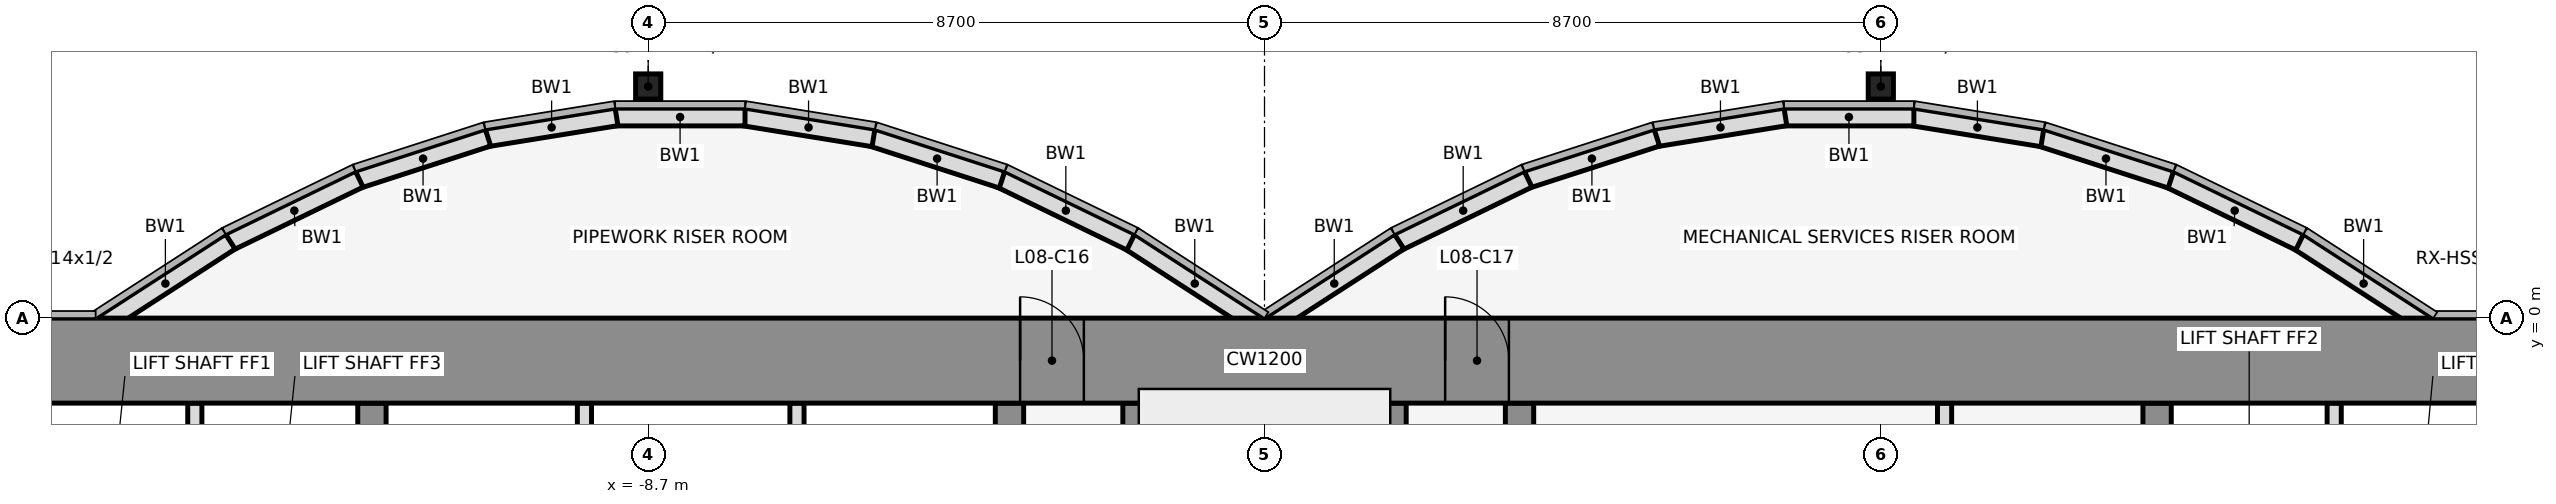
"""IFC4 building model, lengths in metres.
Left out: names, types, materials, properties, quantities, classifications, styles, units other than length and angle.
Written with IfcOpenShell. Run it as: python <this file> out.ifc"""

import sys

from ifc_helpers import new_model, si_unit, direction, frame, frame_2d, origin, origin_2d, place, context, subcontext, project, spatial, rectangle, hollow_rectangle, extrude, element, fill, save


model = new_model("IFC4")
c1 = context("Model", 3, precision=1e-05, world=origin(), true_north=direction((0.0, 1.0)))
c2 = subcontext(c1, "Body", "Model", "MODEL_VIEW")
j1 = project(units=[si_unit("LENGTHUNIT", "METRE"), si_unit("PLANEANGLEUNIT", "RADIAN")], contexts=[c1])
p1 = place(None, origin())
s1 = spatial("IfcSite", under=j1, at=p1, CompositionType="ELEMENT")
p2 = place(p1, origin())
s2 = spatial("IfcBuilding", under=s1, at=p2, CompositionType="ELEMENT")
p3 = place(p2, frame((0.0, 0.0, 44.0)))
s3 = spatial("IfcBuildingStorey", under=s2, at=p3, CompositionType="ELEMENT", Elevation=44.0)
for number, where, z_axis, x_axis in (
    (1, (-8.7, 3.269, 0.0), (0.0, 0.0, 1.0), (1.0, 0.0, 0.0)),
    (2, (8.7, 3.269, 0.0), (0.0, 0.0, 1.0), (1.0, 0.0, 0.0)),
):
    element("IfcColumn", number, at=place(p3, frame(where, z_axis=z_axis, x_axis=x_axis)), inside=s3, PredefinedType="COLUMN", context=c2, shape_type="SweptSolid", body=[
        extrude(hollow_rectangle(XDim=0.356, YDim=0.356, WallThickness=0.012, at=origin_2d()), origin(), (0.0, 0.0, 1.0), 4.5),
    ])
p4 = place(p3, frame((16.432, -0.105, 0.0), z_axis=(0.0, 0.0, 1.0), x_axis=(-0.83981312244, 0.542875602121, 0.0)))
e3 = element("IfcWall", 3, at=p4, inside=s3, PredefinedType="STANDARD", context=c2, shape_type="SweptSolid", body=[
    extrude(rectangle(XDim=2.183, YDim=0.25, at=frame_2d((1.091, 0.0))), origin(), (0.0, 0.0, 1.0), 4.35),
])
p5 = place(p3, frame((14.612, 1.073, 0.0), z_axis=(0.0, 0.0, 1.0), x_axis=(-0.89982408427, 0.436252928206, 0.0)))
e4 = element("IfcWall", 4, at=p5, inside=s3, PredefinedType="STANDARD", context=c2, shape_type="SweptSolid", body=[
    extrude(rectangle(XDim=2.038, YDim=0.25, at=frame_2d((1.019, 0.0))), origin(), (0.0, 0.0, 1.0), 4.35),
])
p6 = place(p3, frame((12.795, 1.955, 0.0), z_axis=(0.0, 0.0, 1.0), x_axis=(-0.951495806175, 0.307661714928, 0.0)))
e5 = element("IfcWall", 5, at=p6, inside=s3, PredefinedType="STANDARD", context=c2, shape_type="SweptSolid", body=[
    extrude(rectangle(XDim=1.927, YDim=0.25, at=frame_2d((0.963, 0.0))), origin(), (0.0, 0.0, 1.0), 4.35),
])
p7 = place(p3, frame((10.98, 2.543, 0.0), z_axis=(0.0, 0.0, 1.0), x_axis=(-0.987181718931, 0.159600293885, 0.0)))
e6 = element("IfcWall", 6, at=p7, inside=s3, PredefinedType="STANDARD", context=c2, shape_type="SweptSolid", body=[
    extrude(rectangle(XDim=1.857, YDim=0.25, at=frame_2d((0.929, 0.0))), origin(), (0.0, 0.0, 1.0), 4.35),
])
p8 = place(p3, frame((9.167, 2.838, 0.0), z_axis=(0.0, 0.0, 1.0), x_axis=(-1.0, 0.0, 0.0)))
e7 = element("IfcWall", 7, at=p8, inside=s3, PredefinedType="STANDARD", context=c2, shape_type="SweptSolid", body=[
    extrude(rectangle(XDim=1.833, YDim=0.25, at=frame_2d((0.917, 0.0))), origin(), (0.0, 0.0, 1.0), 4.35),
])
p9 = place(p3, frame((7.353, 2.84, 0.0), z_axis=(0.0, 0.0, 1.0), x_axis=(-0.987181718931, -0.159600293885, 0.0)))
e8 = element("IfcWall", 8, at=p9, inside=s3, PredefinedType="STANDARD", context=c2, shape_type="SweptSolid", body=[
    extrude(rectangle(XDim=1.857, YDim=0.25, at=frame_2d((0.929, 0.0))), origin(), (0.0, 0.0, 1.0), 4.35),
])
p10 = place(p3, frame((5.538, 2.548, 0.0), z_axis=(0.0, 0.0, 1.0), x_axis=(-0.951495806175, -0.307661714928, 0.0)))
e9 = element("IfcWall", 9, at=p10, inside=s3, PredefinedType="STANDARD", context=c2, shape_type="SweptSolid", body=[
    extrude(rectangle(XDim=1.927, YDim=0.25, at=frame_2d((0.963, 0.0))), origin(), (0.0, 0.0, 1.0), 4.35),
])
p11 = place(p3, frame((3.721, 1.962, 0.0), z_axis=(0.0, 0.0, 1.0), x_axis=(-0.89982408427, -0.436252928206, 0.0)))
e10 = element("IfcWall", 10, at=p11, inside=s3, PredefinedType="STANDARD", context=c2, shape_type="SweptSolid", body=[
    extrude(rectangle(XDim=2.038, YDim=0.25, at=frame_2d((1.019, 0.0))), origin(), (0.0, 0.0, 1.0), 4.35),
])
for number, where, z_axis, x_axis in (
    (11, (1.901, 1.08, 0.0), (0.0, 0.0, 1.0), (-0.84, -0.543, 0.0)),
    (12, (-0.068, -0.105, 0.0), (0.0, 0.0, 1.0), (-0.84, 0.543, 0.0)),
):
    element("IfcWall", number, at=place(p3, frame(where, z_axis=z_axis, x_axis=x_axis)), inside=s3, PredefinedType="STANDARD", context=c2, shape_type="SweptSolid", body=[
        extrude(rectangle(XDim=2.183, YDim=0.25, at=frame_2d((1.091, 0.0))), origin(), (0.0, 0.0, 1.0), 4.35),
    ])
p12 = place(p3, frame((-1.888, 1.073, 0.0), z_axis=(0.0, 0.0, 1.0), x_axis=(-0.89982408427, 0.436252928206, 0.0)))
e13 = element("IfcWall", 13, at=p12, inside=s3, PredefinedType="STANDARD", context=c2, shape_type="SweptSolid", body=[
    extrude(rectangle(XDim=2.038, YDim=0.25, at=frame_2d((1.019, 0.0))), origin(), (0.0, 0.0, 1.0), 4.35),
])
p13 = place(p3, frame((-3.705, 1.955, 0.0), z_axis=(0.0, 0.0, 1.0), x_axis=(-0.951495806175, 0.307661714928, 0.0)))
e14 = element("IfcWall", 14, at=p13, inside=s3, PredefinedType="STANDARD", context=c2, shape_type="SweptSolid", body=[
    extrude(rectangle(XDim=1.927, YDim=0.25, at=frame_2d((0.963, 0.0))), origin(), (0.0, 0.0, 1.0), 4.35),
])
p14 = place(p3, frame((-5.52, 2.543, 0.0), z_axis=(0.0, 0.0, 1.0), x_axis=(-0.987181718931, 0.159600293885, 0.0)))
e15 = element("IfcWall", 15, at=p14, inside=s3, PredefinedType="STANDARD", context=c2, shape_type="SweptSolid", body=[
    extrude(rectangle(XDim=1.857, YDim=0.25, at=frame_2d((0.929, 0.0))), origin(), (0.0, 0.0, 1.0), 4.35),
])
p15 = place(p3, frame((-7.333, 2.838, 0.0), z_axis=(0.0, 0.0, 1.0), x_axis=(-1.0, 0.0, 0.0)))
e16 = element("IfcWall", 16, at=p15, inside=s3, PredefinedType="STANDARD", context=c2, shape_type="SweptSolid", body=[
    extrude(rectangle(XDim=1.833, YDim=0.25, at=frame_2d((0.917, 0.0))), origin(), (0.0, 0.0, 1.0), 4.35),
])
p16 = place(p3, frame((-9.147, 2.84, 0.0), z_axis=(0.0, 0.0, 1.0), x_axis=(-0.987181718931, -0.159600293885, 0.0)))
e17 = element("IfcWall", 17, at=p16, inside=s3, PredefinedType="STANDARD", context=c2, shape_type="SweptSolid", body=[
    extrude(rectangle(XDim=1.857, YDim=0.25, at=frame_2d((0.929, 0.0))), origin(), (0.0, 0.0, 1.0), 4.35),
])
p17 = place(p3, frame((-10.962, 2.548, 0.0), z_axis=(0.0, 0.0, 1.0), x_axis=(-0.951495806175, -0.307661714928, 0.0)))
e18 = element("IfcWall", 18, at=p17, inside=s3, PredefinedType="STANDARD", context=c2, shape_type="SweptSolid", body=[
    extrude(rectangle(XDim=1.927, YDim=0.25, at=frame_2d((0.963, 0.0))), origin(), (0.0, 0.0, 1.0), 4.35),
])
p18 = place(p3, frame((-12.779, 1.962, 0.0), z_axis=(0.0, 0.0, 1.0), x_axis=(-0.89982408427, -0.436252928206, 0.0)))
e19 = element("IfcWall", 19, at=p18, inside=s3, PredefinedType="STANDARD", context=c2, shape_type="SweptSolid", body=[
    extrude(rectangle(XDim=2.038, YDim=0.25, at=frame_2d((1.019, 0.0))), origin(), (0.0, 0.0, 1.0), 4.35),
])
p19 = place(p3, frame((-14.599, 1.08, 0.0), z_axis=(0.0, 0.0, 1.0), x_axis=(-0.83981312244, -0.542875602121, 0.0)))
e20 = element("IfcWall", 20, at=p19, inside=s3, PredefinedType="STANDARD", context=c2, shape_type="SweptSolid", body=[
    extrude(rectangle(XDim=2.183, YDim=0.25, at=frame_2d((1.091, 0.0))), origin(), (0.0, 0.0, 1.0), 4.35),
])
p20 = place(p3, frame((-15.1, -4.6, 0.0), z_axis=(0.0, 0.0, 1.0), x_axis=(0.0, 1.0, 0.0)))
e21 = element("IfcWall", 21, at=p20, inside=s3, PredefinedType="PARTITIONING", context=c2, shape_type="SweptSolid", body=[
    extrude(rectangle(XDim=3.4, YDim=0.2, at=frame_2d((1.7, 0.0))), origin(), (0.0, 0.0, 1.0), 3.418),
])
p21 = place(p3, frame((-12.6, -11.8, 0.0), z_axis=(0.0, 0.0, 1.0), x_axis=(0.0, 1.0, 0.0)))
e22 = element("IfcWall", 22, at=p21, inside=s3, PredefinedType="SHEAR", context=c2, shape_type="SweptSolid", body=[
    extrude(rectangle(XDim=10.6, YDim=0.4, at=frame_2d((5.3, 0.0))), origin(), (0.0, 0.0, 1.0), 4.5),
])
p22 = place(p21, frame((4.75, 0.0, 0.0)))
e23 = element("IfcOpeningElement", 23, at=p22, cuts=e22, PredefinedType="OPENING", context=c2, shape_type="SweptSolid", body=[
    extrude(rectangle(XDim=1.1, YDim=2.1, at=frame_2d((0.55, 1.05))), frame((0.0, 0.212, 0.0), z_axis=(0.0, -1.0, 0.0), x_axis=(1.0, 0.0, 0.0)), (0.0, 0.0, 1.0), 0.424),
])
for number, where, z_axis, x_axis in (
    (24, (-9.6, -4.6, 0.0), (0.0, 0.0, 1.0), (0.0, 1.0, 0.0)),
    (25, (-6.6, -4.6, 0.0), (0.0, 0.0, 1.0), (0.0, 1.0, 0.0)),
):
    element("IfcWall", number, at=place(p3, frame(where, z_axis=z_axis, x_axis=x_axis)), inside=s3, PredefinedType="PARTITIONING", context=c2, shape_type="SweptSolid", body=[
        extrude(rectangle(XDim=3.4, YDim=0.2, at=frame_2d((1.7, 0.0))), origin(), (0.0, 0.0, 1.0), 3.418),
    ])
p23 = place(p3, frame((-3.6, -11.8, 0.0), z_axis=(0.0, 0.0, 1.0), x_axis=(0.0, 1.0, 0.0)))
e26 = element("IfcWall", 26, at=p23, inside=s3, PredefinedType="SHEAR", context=c2, shape_type="SweptSolid", body=[
    extrude(rectangle(XDim=10.6, YDim=0.4, at=frame_2d((5.3, 0.0))), origin(), (0.0, 0.0, 1.0), 4.5),
])
p24 = place(p23, frame((4.85, 0.0, 0.0)))
e27 = element("IfcOpeningElement", 27, at=p24, cuts=e26, PredefinedType="OPENING", context=c2, shape_type="SweptSolid", body=[
    extrude(rectangle(XDim=0.9, YDim=2.1, at=frame_2d((0.45, 1.05))), frame((0.0, 0.212, 0.0), z_axis=(0.0, -1.0, 0.0), x_axis=(1.0, 0.0, 0.0)), (0.0, 0.0, 1.0), 0.424),
])
for number, where, z_axis, x_axis in (
    (28, (-1.8, -11.8, 0.0), (0.0, 0.0, 1.0), (0.0, 1.0, 0.0)),
    (29, (1.8, -11.8, 0.0), (0.0, 0.0, 1.0), (0.0, 1.0, 0.0)),
):
    element("IfcWall", number, at=place(p3, frame(where, z_axis=z_axis, x_axis=x_axis)), inside=s3, PredefinedType="SHEAR", context=c2, shape_type="SweptSolid", body=[
        extrude(rectangle(XDim=10.6, YDim=0.4, at=frame_2d((5.3, 0.0))), origin(), (0.0, 0.0, 1.0), 4.5),
    ])
p25 = place(p3, frame((3.6, -11.8, 0.0), z_axis=(0.0, 0.0, 1.0), x_axis=(0.0, 1.0, 0.0)))
e30 = element("IfcWall", 30, at=p25, inside=s3, PredefinedType="SHEAR", context=c2, shape_type="SweptSolid", body=[
    extrude(rectangle(XDim=10.6, YDim=0.4, at=frame_2d((5.3, 0.0))), origin(), (0.0, 0.0, 1.0), 4.5),
])
p26 = place(p25, frame((1.35, 0.0, 0.0)))
e31 = element("IfcOpeningElement", 31, at=p26, cuts=e30, PredefinedType="OPENING", context=c2, shape_type="SweptSolid", body=[
    extrude(rectangle(XDim=0.9, YDim=2.1, at=frame_2d((0.45, 1.05))), frame((0.0, 0.212, 0.0), z_axis=(0.0, -1.0, 0.0), x_axis=(1.0, 0.0, 0.0)), (0.0, 0.0, 1.0), 0.424),
])
p27 = place(p3, frame((9.6, -4.6, 0.0), z_axis=(0.0, 0.0, 1.0), x_axis=(0.0, 1.0, 0.0)))
e32 = element("IfcWall", 32, at=p27, inside=s3, PredefinedType="PARTITIONING", context=c2, shape_type="SweptSolid", body=[
    extrude(rectangle(XDim=3.4, YDim=0.2, at=frame_2d((1.7, 0.0))), origin(), (0.0, 0.0, 1.0), 3.418),
])
p28 = place(p3, frame((12.6, -11.8, 0.0), z_axis=(0.0, 0.0, 1.0), x_axis=(0.0, 1.0, 0.0)))
e33 = element("IfcWall", 33, at=p28, inside=s3, PredefinedType="SHEAR", context=c2, shape_type="SweptSolid", body=[
    extrude(rectangle(XDim=10.6, YDim=0.4, at=frame_2d((5.3, 0.0))), origin(), (0.0, 0.0, 1.0), 4.5),
])
p29 = place(p28, frame((4.75, 0.0, 0.0)))
e34 = element("IfcOpeningElement", 34, at=p29, cuts=e33, PredefinedType="OPENING", context=c2, shape_type="SweptSolid", body=[
    extrude(rectangle(XDim=1.1, YDim=2.1, at=frame_2d((0.55, 1.05))), frame((0.0, 0.212, 0.0), z_axis=(0.0, -1.0, 0.0), x_axis=(1.0, 0.0, 0.0)), (0.0, 0.0, 1.0), 0.424),
])
p30 = place(p3, frame((15.1, -4.6, 0.0), z_axis=(0.0, 0.0, 1.0), x_axis=(0.0, 1.0, 0.0)))
e35 = element("IfcWall", 35, at=p30, inside=s3, PredefinedType="PARTITIONING", context=c2, shape_type="SweptSolid", body=[
    extrude(rectangle(XDim=3.4, YDim=0.2, at=frame_2d((1.7, 0.0))), origin(), (0.0, 0.0, 1.0), 3.418),
])
p31 = place(p3, frame((-22.0, -0.6, 0.0), z_axis=(0.0, 0.0, 1.0), x_axis=(1.0, 0.0, 0.0)))
e36 = element("IfcWall", 36, at=p31, inside=s3, PredefinedType="SHEAR", context=c2, shape_type="SweptSolid", body=[
    extrude(rectangle(XDim=44.0, YDim=1.2, at=frame_2d((22.0, 0.0))), origin(), (0.0, 0.0, 1.0), 4.5),
])
p32 = place(p31, frame((18.55, 0.0, 0.0)))
e37 = element("IfcOpeningElement", 37, at=p32, cuts=e36, PredefinedType="OPENING", context=c2, shape_type="SweptSolid", body=[
    extrude(rectangle(XDim=0.9, YDim=2.1, at=frame_2d((0.45, 1.05))), frame((0.0, 0.612, 0.0), z_axis=(0.0, -1.0, 0.0), x_axis=(1.0, 0.0, 0.0)), (0.0, 0.0, 1.0), 1.224),
])
p33 = place(p31, frame((24.55, 0.0, 0.0)))
e38 = element("IfcOpeningElement", 38, at=p33, cuts=e36, PredefinedType="OPENING", context=c2, shape_type="SweptSolid", body=[
    extrude(rectangle(XDim=0.9, YDim=2.1, at=frame_2d((0.45, 1.05))), frame((0.0, 0.612, 0.0), z_axis=(0.0, -1.0, 0.0), x_axis=(1.0, 0.0, 0.0)), (0.0, 0.0, 1.0), 1.224),
])
p34 = place(p32, origin())
e39 = element("IfcDoor", 39, at=p34, inside=s3, OperationType="SINGLE_SWING_LEFT", PredefinedType="DOOR", context=c2, shape_type="SweptSolid", body=[
    extrude(rectangle(XDim=0.9, YDim=2.1, at=frame_2d((0.45, 1.05))), frame((0.0, 0.025, 0.0), z_axis=(0.0, -1.0, 0.0), x_axis=(1.0, 0.0, 0.0)), (0.0, 0.0, 1.0), 0.05),
])
fill(e37, e39)
p35 = place(p33, origin())
e40 = element("IfcDoor", 40, at=p35, inside=s3, OperationType="SINGLE_SWING_LEFT", PredefinedType="DOOR", context=c2, shape_type="SweptSolid", body=[
    extrude(rectangle(XDim=0.9, YDim=2.1, at=frame_2d((0.45, 1.05))), frame((0.0, 0.025, 0.0), z_axis=(0.0, -1.0, 0.0), x_axis=(1.0, 0.0, 0.0)), (0.0, 0.0, 1.0), 0.05),
])
fill(e38, e40)
save(model, sys.argv[1])
